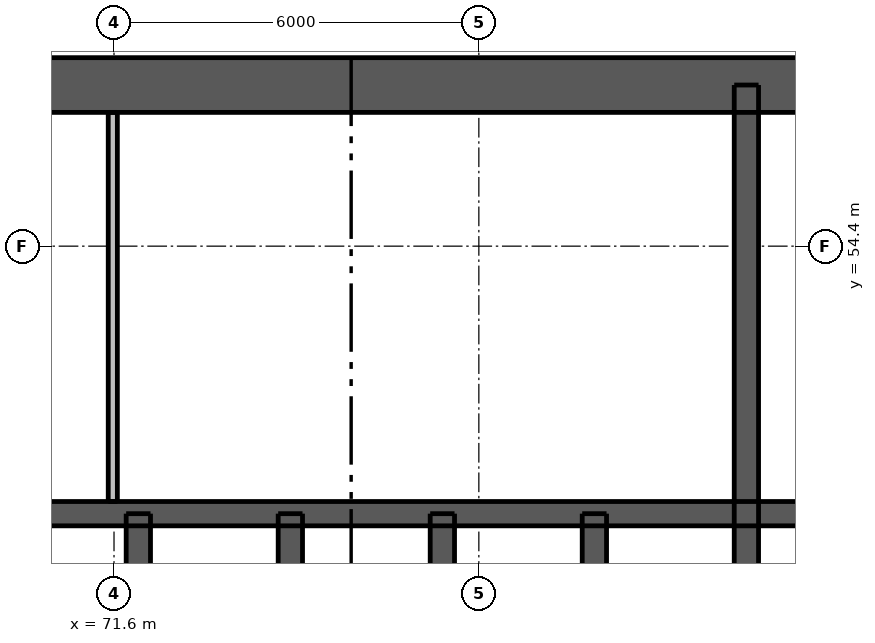
"""IFC4 building model, lengths in metres.
Left out: names, types, materials, properties, quantities, classifications, styles, units other than length and angle.
Written with IfcOpenShell. Run it as: python <this file> out.ifc"""

import sys

from ifc_helpers import new_model, si_unit, direction, frame, frame_2d, origin, place, context, subcontext, project, spatial, rectangle, extrude, element, fill, save


model = new_model("IFC4")
c1 = context("Model", 3, precision=1e-05, world=origin(), true_north=direction((0.0, 1.0)))
c2 = subcontext(c1, "Body", "Model", "MODEL_VIEW")
j1 = project(units=[si_unit("LENGTHUNIT", "METRE"), si_unit("PLANEANGLEUNIT", "RADIAN")], contexts=[c1])
p1 = place(None, origin())
s1 = spatial("IfcSite", under=j1, at=p1, CompositionType="ELEMENT")
p2 = place(p1, origin())
s2 = spatial("IfcBuilding", under=s1, at=p2, CompositionType="ELEMENT")
p3 = place(p2, frame((0.0, 0.0, 59.8)))
s3 = spatial("IfcBuildingStorey", under=s2, at=p3, CompositionType="ELEMENT", Elevation=59.8)
p4 = place(p3, frame((62.5, 57.05, 0.0), z_axis=(0.0, 0.0, 1.0), x_axis=(1.0, 0.0, 0.0)))
e1 = element("IfcWall", 1, at=p4, inside=s3, PredefinedType="SHEAR", context=c2, shape_type="SweptSolid", body=[
    extrude(rectangle(XDim=24.0, YDim=0.9, at=frame_2d((12.0, 0.0))), origin(), (0.0, 0.0, 1.0), 3.05),
])
p5 = place(p4, frame((20.85, 0.0, 0.0)))
e2 = element("IfcOpeningElement", 2, at=p5, cuts=e1, PredefinedType="OPENING", context=c2, shape_type="SweptSolid", body=[
    extrude(rectangle(XDim=1.1, YDim=2.1, at=frame_2d((0.55, 1.05))), frame((0.0, 0.46, 0.0), z_axis=(0.0, -1.0, 0.0), x_axis=(1.0, 0.0, 0.0)), (0.0, 0.0, 1.0), 0.92),
])
p6 = place(p4, frame((2.05, 0.0, 0.0)))
e3 = element("IfcOpeningElement", 3, at=p6, cuts=e1, PredefinedType="OPENING", context=c2, shape_type="SweptSolid", body=[
    extrude(rectangle(XDim=1.1, YDim=2.1, at=frame_2d((0.55, 1.05))), frame((0.0, 0.46, 0.0), z_axis=(0.0, -1.0, 0.0), x_axis=(1.0, 0.0, 0.0)), (0.0, 0.0, 1.0), 0.92),
])
p7 = place(p4, frame((6.44, 0.0, 0.0)))
e4 = element("IfcOpeningElement", 4, at=p7, cuts=e1, PredefinedType="OPENING", context=c2, shape_type="SweptSolid", body=[
    extrude(rectangle(XDim=0.9, YDim=2.1, at=frame_2d((0.45, 1.05))), frame((0.0, 0.46, 0.0), z_axis=(0.0, -1.0, 0.0), x_axis=(1.0, 0.0, 0.0)), (0.0, 0.0, 1.0), 0.92),
])
p8 = place(p4, frame((13.74, 0.0, 0.0)))
e5 = element("IfcOpeningElement", 5, at=p8, cuts=e1, PredefinedType="OPENING", context=c2, shape_type="SweptSolid", body=[
    extrude(rectangle(XDim=0.9, YDim=2.1, at=frame_2d((0.45, 1.05))), frame((0.0, 0.46, 0.0), z_axis=(0.0, -1.0, 0.0), x_axis=(1.0, 0.0, 0.0)), (0.0, 0.0, 1.0), 0.92),
])
p9 = place(p3, frame((62.95, 50.0, 0.0), z_axis=(0.0, 0.0, 1.0), x_axis=(1.0, 0.0, 0.0)))
e6 = element("IfcWall", 6, at=p9, inside=s3, PredefinedType="SHEAR", context=c2, shape_type="SweptSolid", body=[
    extrude(rectangle(XDim=23.1, YDim=0.4, at=frame_2d((11.55, 0.0))), origin(), (0.0, 0.0, 1.0), 3.05),
])
p10 = place(p3, frame((82.0, 47.1, 0.0), z_axis=(0.0, 0.0, 1.0), x_axis=(0.0, 1.0, 0.0)))
e7 = element("IfcWall", 7, at=p10, inside=s3, PredefinedType="SHEAR", context=c2, shape_type="SweptSolid", body=[
    extrude(rectangle(XDim=9.95, YDim=0.4, at=frame_2d((4.975, 0.0))), origin(), (0.0, 0.0, 1.0), 3.05),
])
for number, where, z_axis, x_axis in (
    (8, (72.0, 47.1, 0.0), (0.0, 0.0, 1.0), (0.0, 1.0, 0.0)),
    (9, (74.5, 47.1, 0.0), (0.0, 0.0, 1.0), (0.0, 1.0, 0.0)),
    (10, (77.0, 47.1, 0.0), (0.0, 0.0, 1.0), (0.0, 1.0, 0.0)),
    (11, (79.5, 47.1, 0.0), (0.0, 0.0, 1.0), (0.0, 1.0, 0.0)),
):
    element("IfcWall", number, at=place(p3, frame(where, z_axis=z_axis, x_axis=x_axis)), inside=s3, PredefinedType="SHEAR", context=c2, shape_type="SweptSolid", body=[
        extrude(rectangle(XDim=2.9, YDim=0.4, at=frame_2d((1.45, 0.0))), origin(), (0.0, 0.0, 1.0), 3.05),
    ])
p11 = place(p3, frame((71.58, 50.2, 0.0), z_axis=(0.0, 0.0, 1.0), x_axis=(0.0, 1.0, 0.0)))
e12 = element("IfcWall", 12, at=p11, inside=s3, PredefinedType="PLUMBINGWALL", context=c2, shape_type="SweptSolid", body=[
    extrude(rectangle(XDim=6.4, YDim=0.15, at=frame_2d((3.2, 0.0))), origin(), (0.0, 0.0, 1.0), 3.05),
])
p12 = place(p8, origin())
e13 = element("IfcDoor", 13, at=p12, inside=s3, OperationType="SINGLE_SWING_RIGHT", PredefinedType="DOOR", context=c2, shape_type="SweptSolid", body=[
    extrude(rectangle(XDim=0.9, YDim=2.1, at=frame_2d((0.45, 1.05))), frame((0.0, -0.388, 0.0), z_axis=(0.0, -1.0, 0.0), x_axis=(1.0, 0.0, 0.0)), (0.0, 0.0, 1.0), 0.05),
])
fill(e5, e13)
save(model, sys.argv[1])
